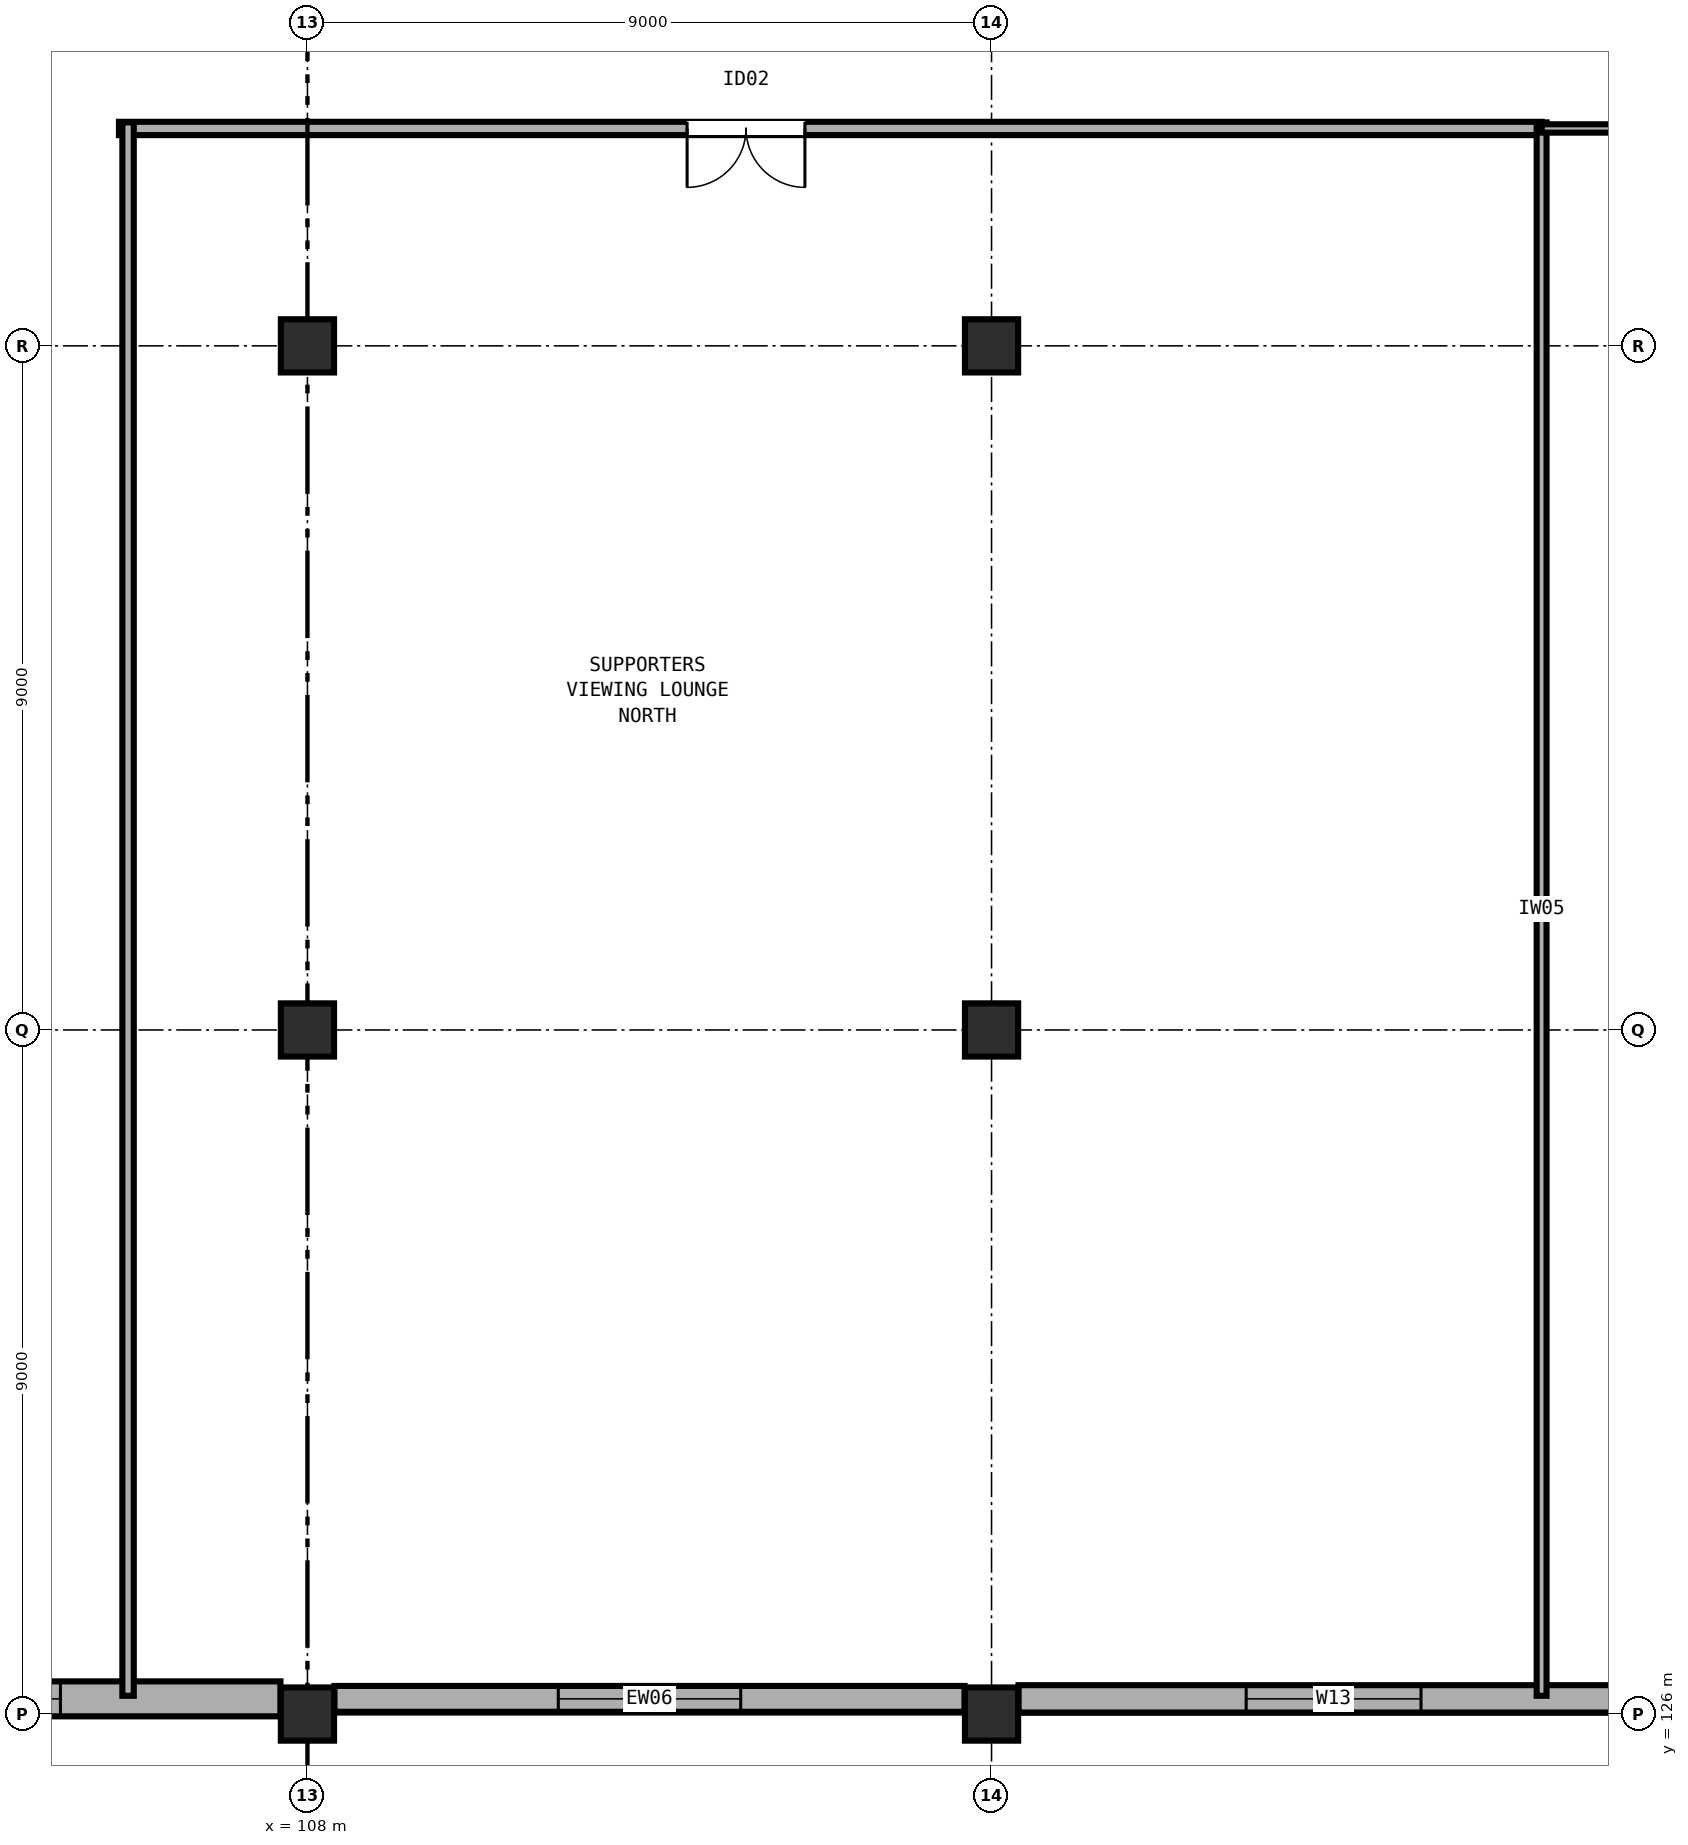
"""IFC4 building model, lengths in metres.
Left out: names, types, materials, properties, quantities, classifications, styles, units other than length and angle.
Written with IfcOpenShell. Run it as: python <this file> out.ifc"""

import sys

from ifc_helpers import new_model, si_unit, direction, frame, frame_2d, origin, origin_2d, place, context, subcontext, project, spatial, rectangle, extrude, element, fill, save


model = new_model("IFC4")
c1 = context("Model", 3, precision=1e-05, world=origin(), true_north=direction((0.0, 1.0)))
c2 = subcontext(c1, "Body", "Model", "MODEL_VIEW")
j1 = project(units=[si_unit("LENGTHUNIT", "METRE"), si_unit("PLANEANGLEUNIT", "RADIAN")], contexts=[c1])
p1 = place(None, origin())
s1 = spatial("IfcSite", under=j1, at=p1, CompositionType="ELEMENT")
p2 = place(p1, origin())
s2 = spatial("IfcBuilding", under=s1, at=p2, CompositionType="ELEMENT")
p3 = place(p2, frame((0.0, 0.0, 9.6)))
s3 = spatial("IfcBuildingStorey", under=s2, at=p3, CompositionType="ELEMENT", Elevation=9.6)
for number, where, z_axis, x_axis in (
    (1, (108.0, 126.0, 0.0), (0.0, 0.0, 1.0), (1.0, 0.0, 0.0)),
    (2, (108.0, 135.0, 0.0), (0.0, 0.0, 1.0), (1.0, 0.0, 0.0)),
    (3, (108.0, 144.0, 0.0), (0.0, 0.0, 1.0), (1.0, 0.0, 0.0)),
    (4, (117.0, 126.0, 0.0), (0.0, 0.0, 1.0), (1.0, 0.0, 0.0)),
    (5, (117.0, 135.0, 0.0), (0.0, 0.0, 1.0), (1.0, 0.0, 0.0)),
    (6, (117.0, 144.0, 0.0), (0.0, 0.0, 1.0), (1.0, 0.0, 0.0)),
):
    element("IfcColumn", number, at=place(p3, frame(where, z_axis=z_axis, x_axis=x_axis)), inside=s3, PredefinedType="COLUMN", context=c2, shape_type="SweptSolid", body=[
        extrude(rectangle(XDim=0.7, YDim=0.7, at=origin_2d()), origin(), (0.0, 0.0, 1.0), 4.8),
    ])
p4 = place(p3, frame((125.645, 126.2, 0.0), z_axis=(0.0, 0.0, 1.0), x_axis=(-1.0, 0.0, 0.0)))
e7 = element("IfcWall", 7, at=p4, inside=s3, PredefinedType="SOLIDWALL", context=c2, shape_type="SweptSolid", body=[
    extrude(rectangle(XDim=8.29, YDim=0.36, at=frame_2d((4.145, 0.0))), origin(), (0.0, 0.0, 1.0), 3.58),
])
p5 = place(p4, frame((2.995, 0.0, 0.9)))
e8 = element("IfcOpeningElement", 8, at=p5, cuts=e7, PredefinedType="OPENING", context=c2, shape_type="SweptSolid", body=[
    extrude(rectangle(XDim=2.3, YDim=2.0, at=frame_2d((1.15, 1.0))), frame((0.0, 0.19, 0.0), z_axis=(0.0, -1.0, 0.0), x_axis=(1.0, 0.0, 0.0)), (0.0, 0.0, 1.0), 0.38),
])
p6 = place(p3, frame((116.645, 126.2, 0.0), z_axis=(0.0, 0.0, 1.0), x_axis=(-1.0, 0.0, 0.0)))
e9 = element("IfcWall", 9, at=p6, inside=s3, PredefinedType="SOLIDWALL", context=c2, shape_type="SweptSolid", body=[
    extrude(rectangle(XDim=8.29, YDim=0.34, at=frame_2d((4.145, 0.0))), origin(), (0.0, 0.0, 1.0), 3.58),
])
p7 = place(p6, frame((2.945, 0.0, 0.9)))
e10 = element("IfcOpeningElement", 10, at=p7, cuts=e9, PredefinedType="OPENING", context=c2, shape_type="SweptSolid", body=[
    extrude(rectangle(XDim=2.4, YDim=2.05, at=frame_2d((1.2, 1.025))), frame((0.0, 0.18, 0.0), z_axis=(0.0, -1.0, 0.0), x_axis=(1.0, 0.0, 0.0)), (0.0, 0.0, 1.0), 0.36),
])
p8 = place(p3, frame((107.645, 126.2, 0.0), z_axis=(0.0, 0.0, 1.0), x_axis=(-1.0, 0.0, 0.0)))
e11 = element("IfcWall", 11, at=p8, inside=s3, PredefinedType="SOLIDWALL", context=c2, shape_type="SweptSolid", body=[
    extrude(rectangle(XDim=8.29, YDim=0.46, at=frame_2d((4.145, 0.0))), origin(), (0.0, 0.0, 1.0), 3.58),
])
p9 = place(p8, frame((2.895, 0.0, 0.9)))
e12 = element("IfcOpeningElement", 12, at=p9, cuts=e11, PredefinedType="OPENING", context=c2, shape_type="SweptSolid", body=[
    extrude(rectangle(XDim=2.5, YDim=2.1, at=frame_2d((1.25, 1.05))), frame((0.0, 0.24, 0.0), z_axis=(0.0, -1.0, 0.0), x_axis=(1.0, 0.0, 0.0)), (0.0, 0.0, 1.0), 0.48),
])
p10 = place(p3, frame((124.237, 146.86, 0.0), z_axis=(0.0, 0.0, 1.0), x_axis=(-1.0, 0.0, 0.0)))
e13 = element("IfcWall", 13, at=p10, inside=s3, PredefinedType="PARTITIONING", context=c2, shape_type="SweptSolid", body=[
    extrude(rectangle(XDim=18.717, YDim=0.175, at=frame_2d((9.358, 0.0))), origin(), (0.0, 0.0, 1.0), 3.56),
])
p11 = place(p10, frame((9.692, 0.0, 0.0)))
e14 = element("IfcOpeningElement", 14, at=p11, cuts=e13, PredefinedType="OPENING", context=c2, shape_type="SweptSolid", body=[
    extrude(rectangle(XDim=1.55, YDim=2.2, at=frame_2d((0.775, 1.1))), frame((0.0, 0.097, 0.0), z_axis=(0.0, -1.0, 0.0), x_axis=(1.0, 0.0, 0.0)), (0.0, 0.0, 1.0), 0.195),
])
p12 = place(p3, frame((105.64, 126.24, 0.0), z_axis=(0.0, 0.0, 1.0), x_axis=(0.0, 1.0, 0.0)))
e15 = element("IfcWall", 15, at=p12, inside=s3, PredefinedType="PARTITIONING", context=c2, shape_type="SweptSolid", body=[
    extrude(rectangle(XDim=20.7, YDim=0.15, at=frame_2d((10.35, 0.0))), origin(), (0.0, 0.0, 1.0), 3.56),
])
p13 = place(p3, frame((124.237, 146.94, 0.0), z_axis=(0.0, 0.0, 1.0), x_axis=(0.0, -1.0, 0.0)))
e16 = element("IfcWall", 16, at=p13, inside=s3, PredefinedType="PARTITIONING", context=c2, shape_type="SweptSolid", body=[
    extrude(rectangle(XDim=20.7, YDim=0.13, at=frame_2d((10.35, 0.0))), origin(), (0.0, 0.0, 1.0), 3.56),
])
p14 = place(p3, frame((142.833, 146.86, 0.0), z_axis=(0.0, 0.0, 1.0), x_axis=(-1.0, 0.0, 0.0)))
e17 = element("IfcWall", 17, at=p14, inside=s3, PredefinedType="PARTITIONING", context=c2, shape_type="SweptSolid", body=[
    extrude(rectangle(XDim=18.596, YDim=0.11, at=frame_2d((9.298, 0.0))), origin(), (0.0, 0.0, 1.0), 3.56),
])
p15 = place(p14, frame((10.801, 0.0, 0.0)))
e18 = element("IfcOpeningElement", 18, at=p15, cuts=e17, PredefinedType="OPENING", context=c2, shape_type="SweptSolid", body=[
    extrude(rectangle(XDim=1.4, YDim=2.15, at=frame_2d((0.7, 1.075))), frame((0.0, 0.065, 0.0), z_axis=(0.0, -1.0, 0.0), x_axis=(1.0, 0.0, 0.0)), (0.0, 0.0, 1.0), 0.13),
])
p16 = place(p5, origin())
e19 = element("IfcWindow", 19, at=p16, inside=s3, PartitioningType="DOUBLE_PANEL_VERTICAL", PredefinedType="WINDOW", context=c2, shape_type="SweptSolid", body=[
    extrude(rectangle(XDim=2.3, YDim=2.0, at=frame_2d((1.15, 1.0))), frame((0.0, 0.03, 0.0), z_axis=(0.0, -1.0, 0.0), x_axis=(1.0, 0.0, 0.0)), (0.0, 0.0, 1.0), 0.06),
])
fill(e8, e19)
p17 = place(p7, origin())
e20 = element("IfcWindow", 20, at=p17, inside=s3, PartitioningType="DOUBLE_PANEL_VERTICAL", PredefinedType="WINDOW", context=c2, shape_type="SweptSolid", body=[
    extrude(rectangle(XDim=2.4, YDim=2.05, at=frame_2d((1.2, 1.025))), frame((0.0, 0.03, 0.0), z_axis=(0.0, -1.0, 0.0), x_axis=(1.0, 0.0, 0.0)), (0.0, 0.0, 1.0), 0.06),
])
fill(e10, e20)
p18 = place(p9, origin())
e21 = element("IfcWindow", 21, at=p18, inside=s3, PartitioningType="DOUBLE_PANEL_VERTICAL", PredefinedType="WINDOW", context=c2, shape_type="SweptSolid", body=[
    extrude(rectangle(XDim=2.5, YDim=2.1, at=frame_2d((1.25, 1.05))), frame((0.0, 0.03, 0.0), z_axis=(0.0, -1.0, 0.0), x_axis=(1.0, 0.0, 0.0)), (0.0, 0.0, 1.0), 0.06),
])
fill(e12, e21)
p19 = place(p11, origin())
e22 = element("IfcDoor", 22, at=p19, inside=s3, OperationType="DOUBLE_DOOR_SINGLE_SWING", PredefinedType="DOOR", context=c2, shape_type="SweptSolid", body=[
    extrude(rectangle(XDim=1.55, YDim=2.2, at=frame_2d((0.775, 1.1))), frame((0.0, 0.025, 0.0), z_axis=(0.0, -1.0, 0.0), x_axis=(1.0, 0.0, 0.0)), (0.0, 0.0, 1.0), 0.05),
])
fill(e14, e22)
save(model, sys.argv[1])
